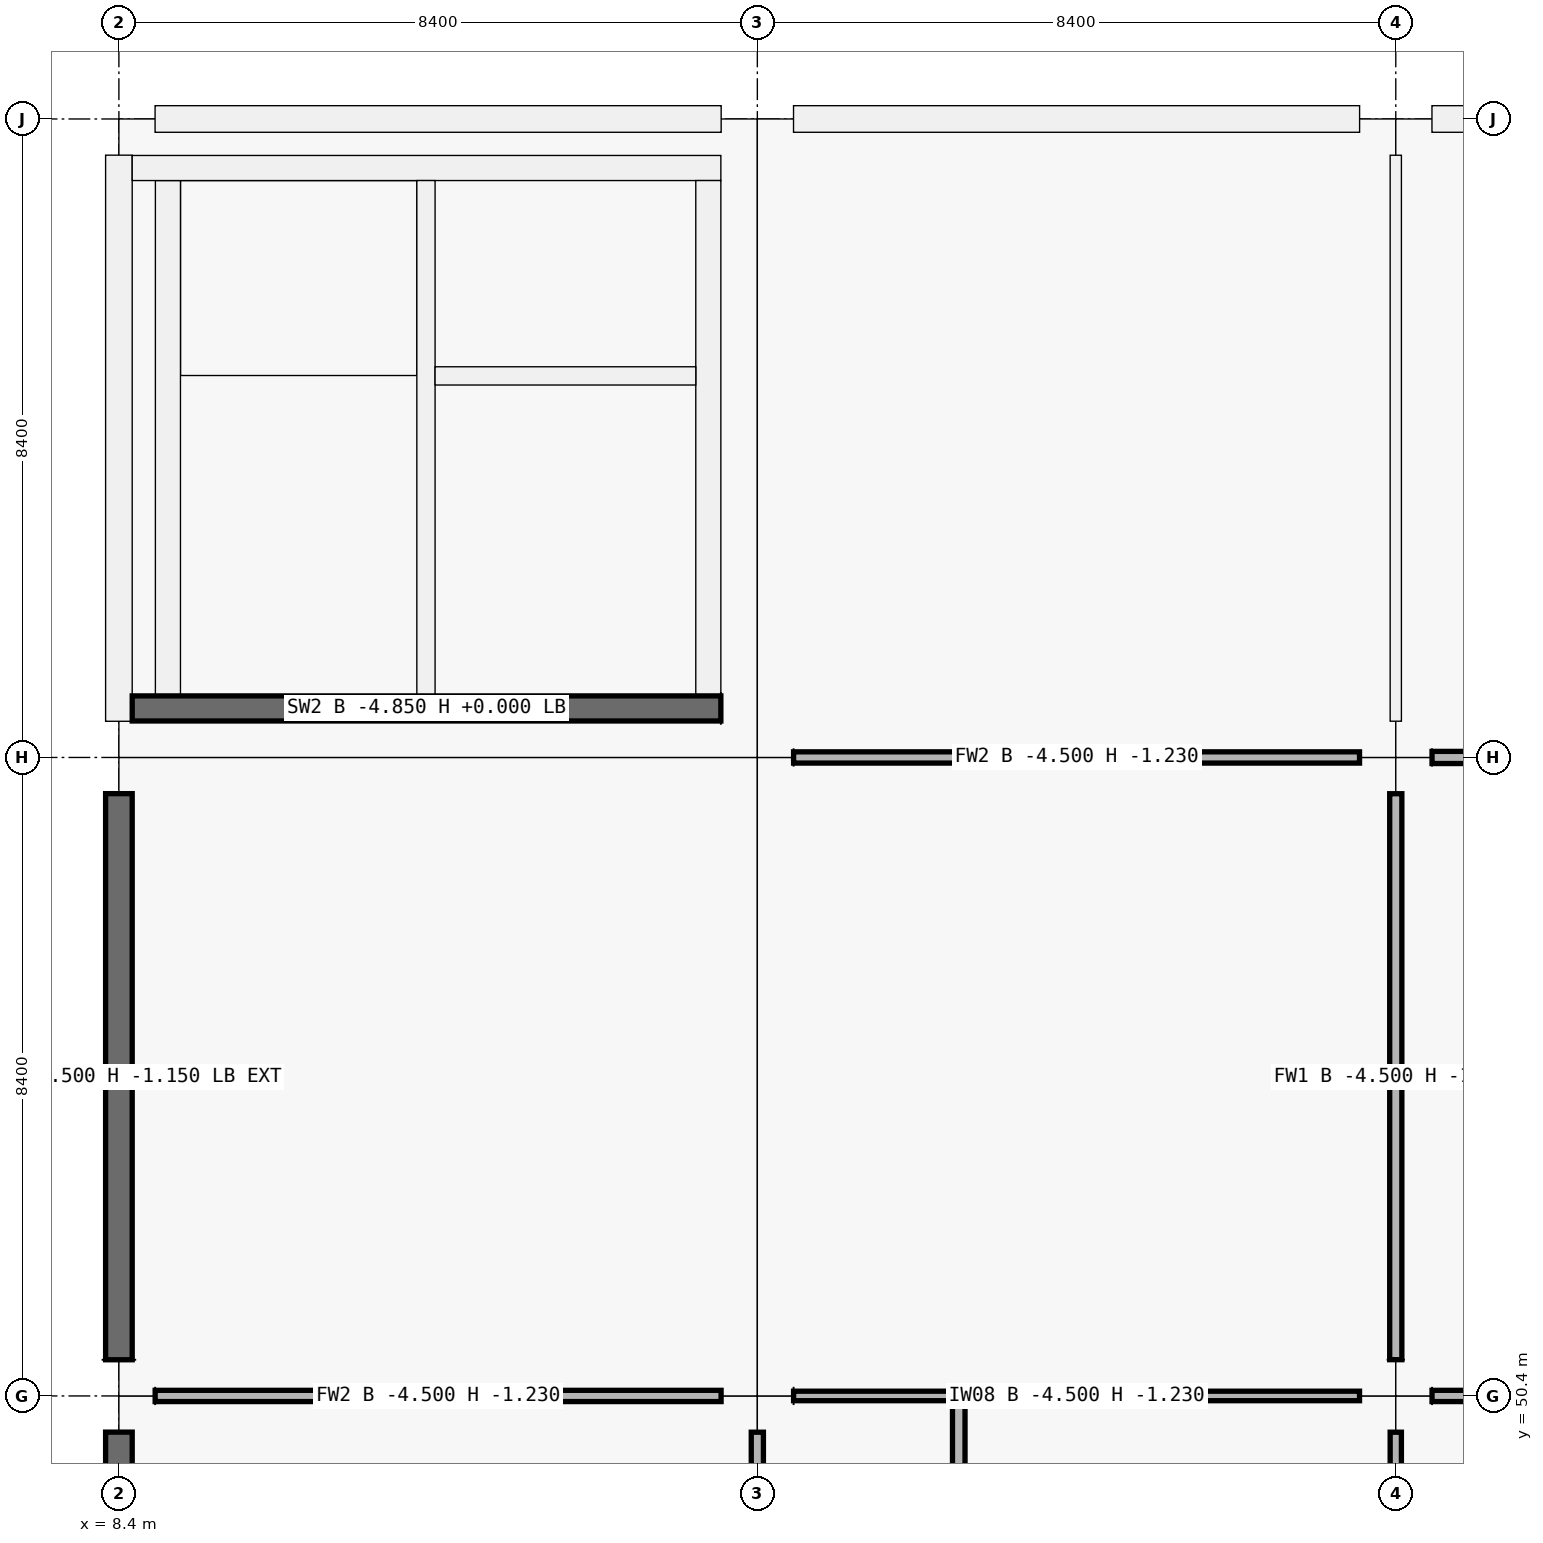
"""IFC4 building model, lengths in metres.
Left out: names, types, materials, properties, quantities, classifications, styles, units other than length and angle.
Written with IfcOpenShell. Run it as: python <this file> out.ifc"""

import sys

from ifc_helpers import new_model, si_unit, direction, frame, frame_2d, origin, origin_2d, place, context, subcontext, project, spatial, rectangle, extrude, element, fill, save


model = new_model("IFC4")
c1 = context("Model", 3, precision=1e-05, world=origin(), true_north=direction((0.0, 1.0)))
c2 = subcontext(c1, "Body", "Model", "MODEL_VIEW")
j1 = project(units=[si_unit("LENGTHUNIT", "METRE"), si_unit("PLANEANGLEUNIT", "RADIAN")], contexts=[c1])
p1 = place(None, origin())
s1 = spatial("IfcSite", under=j1, at=p1, CompositionType="ELEMENT")
p2 = place(p1, origin())
s2 = spatial("IfcBuilding", under=s1, at=p2, CompositionType="ELEMENT")
p3 = place(p2, frame((0.0, 0.0, -4.5)))
s3 = spatial("IfcBuildingStorey", under=s2, at=p3, CompositionType="ELEMENT", Elevation=-4.5)
for number, where, z_axis, x_axis in (
    (1, (8.4, 50.4, -0.35), (0.0, 0.0, 1.0), (1.0, 0.0, 0.0)),
    (2, (8.4, 58.8, -0.35), (0.0, 0.0, 1.0), (1.0, 0.0, 0.0)),
    (3, (8.4, 67.2, -0.35), (0.0, 0.0, 1.0), (1.0, 0.0, 0.0)),
    (4, (16.8, 50.4, -0.35), (0.0, 0.0, 1.0), (1.0, 0.0, 0.0)),
    (5, (16.8, 58.8, -0.35), (0.0, 0.0, 1.0), (1.0, 0.0, 0.0)),
    (6, (16.8, 67.2, -0.35), (0.0, 0.0, 1.0), (1.0, 0.0, 0.0)),
    (7, (25.2, 50.4, -0.35), (0.0, 0.0, 1.0), (1.0, 0.0, 0.0)),
    (8, (25.2, 58.8, -0.35), (0.0, 0.0, 1.0), (1.0, 0.0, 0.0)),
    (9, (25.2, 67.2, -0.35), (0.0, 0.0, 1.0), (1.0, 0.0, 0.0)),
):
    element("IfcColumn", number, at=place(p3, frame(where, z_axis=z_axis, x_axis=x_axis)), inside=s3, PredefinedType="COLUMN", context=c2, shape_type="SweptSolid", body=[
        extrude(rectangle(XDim=0.95, YDim=0.95, at=origin_2d()), origin(), (0.0, 0.0, 1.0), 4.85),
    ])
for number, where, z_axis, x_axis in (
    (10, (8.4, 42.476, 0.0), (0.0, 0.0, 1.0), (0.0, 1.0, 0.0)),
    (11, (8.4, 50.876, 0.0), (0.0, 0.0, 1.0), (0.0, 1.0, 0.0)),
):
    element("IfcWall", number, at=place(p3, frame(where, z_axis=z_axis, x_axis=x_axis)), inside=s3, PredefinedType="SOLIDWALL", context=c2, shape_type="SweptSolid", body=[
        extrude(rectangle(XDim=7.448, YDim=0.35, at=frame_2d((3.724, 0.0))), origin(), (0.0, 0.0, 1.0), 3.35),
    ])
p4 = place(p3, frame((8.4, 59.276, 0.0), z_axis=(0.0, 0.0, 1.0), x_axis=(0.0, 1.0, 0.0)))
e12 = element("IfcWall", 12, at=p4, inside=s3, PredefinedType="SOLIDWALL", context=c2, shape_type="SweptSolid", body=[
    extrude(rectangle(XDim=7.448, YDim=0.35, at=frame_2d((3.724, 0.0))), origin(), (0.0, 0.0, 1.0), 3.35),
])
p5 = place(p3, frame((8.876, 67.2, 0.0), z_axis=(0.0, 0.0, 1.0), x_axis=(1.0, 0.0, 0.0)))
e13 = element("IfcWall", 13, at=p5, inside=s3, PredefinedType="SOLIDWALL", context=c2, shape_type="SweptSolid", body=[
    extrude(rectangle(XDim=7.448, YDim=0.35, at=frame_2d((3.724, 0.0))), origin(), (0.0, 0.0, 1.0), 3.35),
])
p6 = place(p3, frame((17.276, 67.2, 0.0), z_axis=(0.0, 0.0, 1.0), x_axis=(1.0, 0.0, 0.0)))
e14 = element("IfcWall", 14, at=p6, inside=s3, PredefinedType="SOLIDWALL", context=c2, shape_type="SweptSolid", body=[
    extrude(rectangle(XDim=7.448, YDim=0.35, at=frame_2d((3.724, 0.0))), origin(), (0.0, 0.0, 1.0), 3.35),
])
p7 = place(p3, frame((25.676, 67.2, 0.0), z_axis=(0.0, 0.0, 1.0), x_axis=(1.0, 0.0, 0.0)))
e15 = element("IfcWall", 15, at=p7, inside=s3, PredefinedType="SOLIDWALL", context=c2, shape_type="SweptSolid", body=[
    extrude(rectangle(XDim=7.448, YDim=0.35, at=frame_2d((3.724, 0.0))), origin(), (0.0, 0.0, 1.0), 3.35),
])
p8 = place(p3, frame((16.32, 59.445, -0.35), z_axis=(0.0, 0.0, 1.0), x_axis=(-1.0, 0.0, 0.0)))
e16 = element("IfcWall", 16, at=p8, inside=s3, PredefinedType="SHEAR", context=c2, shape_type="SweptSolid", body=[
    extrude(rectangle(XDim=7.745, YDim=0.33, at=frame_2d((3.873, 0.0))), origin(), (0.0, 0.0, 1.0), 4.85),
])
p9 = place(p8, frame((1.28, 0.0, 0.35)))
e17 = element("IfcOpeningElement", 17, at=p9, cuts=e16, PredefinedType="OPENING", context=c2, shape_type="SweptSolid", body=[
    extrude(rectangle(XDim=1.5, YDim=2.15, at=frame_2d((0.75, 1.075))), frame((0.0, 0.165, 0.0), z_axis=(0.0, -1.0, 0.0), x_axis=(1.0, 0.0, 0.0)), (0.0, 0.0, 1.0), 0.33),
])
p10 = place(p3, frame((9.045, 59.61, -0.35), z_axis=(0.0, 0.0, 1.0), x_axis=(0.0, 1.0, 0.0)))
e18 = element("IfcWall", 18, at=p10, inside=s3, PredefinedType="SHEAR", context=c2, shape_type="SweptSolid", body=[
    extrude(rectangle(XDim=6.78, YDim=0.33, at=frame_2d((3.39, 0.0))), origin(), (0.0, 0.0, 1.0), 4.85),
])
p11 = place(p3, frame((8.575, 66.555, -0.35), z_axis=(0.0, 0.0, 1.0), x_axis=(1.0, 0.0, 0.0)))
e19 = element("IfcWall", 19, at=p11, inside=s3, PredefinedType="SHEAR", context=c2, shape_type="SweptSolid", body=[
    extrude(rectangle(XDim=7.745, YDim=0.33, at=frame_2d((3.873, 0.0))), origin(), (0.0, 0.0, 1.0), 4.85),
])
p12 = place(p3, frame((16.155, 66.39, -0.35), z_axis=(0.0, 0.0, 1.0), x_axis=(0.0, -1.0, 0.0)))
e20 = element("IfcWall", 20, at=p12, inside=s3, PredefinedType="SHEAR", context=c2, shape_type="SweptSolid", body=[
    extrude(rectangle(XDim=6.78, YDim=0.33, at=frame_2d((3.39, 0.0))), origin(), (0.0, 0.0, 1.0), 4.85),
])
p13 = place(p3, frame((12.44, 59.61, -0.35), z_axis=(0.0, 0.0, 1.0), x_axis=(0.0, 1.0, 0.0)))
e21 = element("IfcWall", 21, at=p13, inside=s3, PredefinedType="SHEAR", context=c2, shape_type="SweptSolid", body=[
    extrude(rectangle(XDim=6.78, YDim=0.24, at=frame_2d((3.39, 0.0))), origin(), (0.0, 0.0, 1.0), 4.85),
])
p14 = place(p13, frame((0.12, 0.0, 0.35)))
e22 = element("IfcOpeningElement", 22, at=p14, cuts=e21, PredefinedType="OPENING", context=c2, shape_type="SweptSolid", body=[
    extrude(rectangle(XDim=1.0, YDim=2.15, at=frame_2d((0.5, 1.075))), frame((0.0, 0.12, 0.0), z_axis=(0.0, -1.0, 0.0), x_axis=(1.0, 0.0, 0.0)), (0.0, 0.0, 1.0), 0.24),
])
p15 = place(p3, frame((12.56, 63.82, -0.35), z_axis=(0.0, 0.0, 1.0), x_axis=(1.0, 0.0, 0.0)))
e23 = element("IfcWall", 23, at=p15, inside=s3, PredefinedType="SHEAR", context=c2, shape_type="SweptSolid", body=[
    extrude(rectangle(XDim=3.43, YDim=0.24, at=frame_2d((1.715, 0.0))), origin(), (0.0, 0.0, 1.0), 4.85),
])
p16 = place(p15, frame((1.165, 0.0, 0.35)))
e24 = element("IfcOpeningElement", 24, at=p16, cuts=e23, PredefinedType="OPENING", context=c2, shape_type="SweptSolid", body=[
    extrude(rectangle(XDim=1.1, YDim=2.15, at=frame_2d((0.55, 1.075))), frame((0.0, 0.12, 0.0), z_axis=(0.0, -1.0, 0.0), x_axis=(1.0, 0.0, 0.0)), (0.0, 0.0, 1.0), 0.24),
])
p17 = place(p3, frame((8.877, 50.4, 0.0), z_axis=(0.0, 0.0, 1.0), x_axis=(1.0, 0.0, 0.0)))
e25 = element("IfcWall", 25, at=p17, inside=s3, PredefinedType="PARTITIONING", context=c2, shape_type="SweptSolid", body=[
    extrude(rectangle(XDim=7.446, YDim=0.148, at=frame_2d((3.723, 0.0))), origin(), (0.0, 0.0, 1.0), 3.27),
])
p18 = place(p17, frame((3.148, 0.0, 0.0)))
e26 = element("IfcOpeningElement", 26, at=p18, cuts=e25, PredefinedType="OPENING", context=c2, shape_type="SweptSolid", body=[
    extrude(rectangle(XDim=1.15, YDim=2.2, at=frame_2d((0.575, 1.1))), frame((0.0, 0.074, 0.0), z_axis=(0.0, -1.0, 0.0), x_axis=(1.0, 0.0, 0.0)), (0.0, 0.0, 1.0), 0.148),
])
p19 = place(p3, frame((17.277, 50.4, 0.0), z_axis=(0.0, 0.0, 1.0), x_axis=(1.0, 0.0, 0.0)))
e27 = element("IfcWall", 27, at=p19, inside=s3, PredefinedType="PARTITIONING", context=c2, shape_type="SweptSolid", body=[
    extrude(rectangle(XDim=7.446, YDim=0.125, at=frame_2d((3.723, 0.0))), origin(), (0.0, 0.0, 1.0), 3.27),
])
p20 = place(p19, frame((0.528, 0.0, 0.0)))
e28 = element("IfcOpeningElement", 28, at=p20, cuts=e27, PredefinedType="OPENING", context=c2, shape_type="SweptSolid", body=[
    extrude(rectangle(XDim=0.92, YDim=2.1, at=frame_2d((0.46, 1.05))), frame((0.0, 0.062, 0.0), z_axis=(0.0, -1.0, 0.0), x_axis=(1.0, 0.0, 0.0)), (0.0, 0.0, 1.0), 0.125),
])
p21 = place(p19, frame((4.418, 0.0, 0.0)))
e29 = element("IfcOpeningElement", 29, at=p21, cuts=e27, PredefinedType="OPENING", context=c2, shape_type="SweptSolid", body=[
    extrude(rectangle(XDim=0.98, YDim=2.08, at=frame_2d((0.49, 1.04))), frame((0.0, 0.062, 0.0), z_axis=(0.0, -1.0, 0.0), x_axis=(1.0, 0.0, 0.0)), (0.0, 0.0, 1.0), 0.125),
])
p22 = place(p3, frame((17.277, 58.8, 0.0), z_axis=(0.0, 0.0, 1.0), x_axis=(1.0, 0.0, 0.0)))
e30 = element("IfcWall", 30, at=p22, inside=s3, PredefinedType="PARTITIONING", context=c2, shape_type="SweptSolid", body=[
    extrude(rectangle(XDim=7.446, YDim=0.148, at=frame_2d((3.723, 0.0))), origin(), (0.0, 0.0, 1.0), 3.27),
])
p23 = place(p22, frame((3.173, 0.0, 0.0)))
e31 = element("IfcOpeningElement", 31, at=p23, cuts=e30, PredefinedType="OPENING", context=c2, shape_type="SweptSolid", body=[
    extrude(rectangle(XDim=1.1, YDim=2.15, at=frame_2d((0.55, 1.075))), frame((0.0, 0.074, 0.0), z_axis=(0.0, -1.0, 0.0), x_axis=(1.0, 0.0, 0.0)), (0.0, 0.0, 1.0), 0.148),
])
p24 = place(p3, frame((25.677, 50.4, 0.0), z_axis=(0.0, 0.0, 1.0), x_axis=(1.0, 0.0, 0.0)))
e32 = element("IfcWall", 32, at=p24, inside=s3, PredefinedType="PARTITIONING", context=c2, shape_type="SweptSolid", body=[
    extrude(rectangle(XDim=7.446, YDim=0.148, at=frame_2d((3.723, 0.0))), origin(), (0.0, 0.0, 1.0), 3.27),
])
p25 = place(p24, frame((3.223, 0.0, 0.0)))
e33 = element("IfcOpeningElement", 33, at=p25, cuts=e32, PredefinedType="OPENING", context=c2, shape_type="SweptSolid", body=[
    extrude(rectangle(XDim=1.0, YDim=2.15, at=frame_2d((0.5, 1.075))), frame((0.0, 0.074, 0.0), z_axis=(0.0, -1.0, 0.0), x_axis=(1.0, 0.0, 0.0)), (0.0, 0.0, 1.0), 0.148),
])
p26 = place(p3, frame((25.677, 58.8, 0.0), z_axis=(0.0, 0.0, 1.0), x_axis=(1.0, 0.0, 0.0)))
e34 = element("IfcWall", 34, at=p26, inside=s3, PredefinedType="PARTITIONING", context=c2, shape_type="SweptSolid", body=[
    extrude(rectangle(XDim=7.446, YDim=0.16, at=frame_2d((3.723, 0.0))), origin(), (0.0, 0.0, 1.0), 3.27),
])
p27 = place(p26, frame((3.273, 0.0, 0.0)))
e35 = element("IfcOpeningElement", 35, at=p27, cuts=e34, PredefinedType="OPENING", context=c2, shape_type="SweptSolid", body=[
    extrude(rectangle(XDim=0.9, YDim=2.05, at=frame_2d((0.45, 1.025))), frame((0.0, 0.08, 0.0), z_axis=(0.0, -1.0, 0.0), x_axis=(1.0, 0.0, 0.0)), (0.0, 0.0, 1.0), 0.16),
])
p28 = place(p3, frame((16.8, 42.477, 0.0), z_axis=(0.0, 0.0, 1.0), x_axis=(0.0, 1.0, 0.0)))
e36 = element("IfcWall", 36, at=p28, inside=s3, PredefinedType="PARTITIONING", context=c2, shape_type="SweptSolid", body=[
    extrude(rectangle(XDim=7.446, YDim=0.16, at=frame_2d((3.723, 0.0))), origin(), (0.0, 0.0, 1.0), 3.27),
])
p29 = place(p3, frame((25.2, 42.477, 0.0), z_axis=(0.0, 0.0, 1.0), x_axis=(0.0, 1.0, 0.0)))
e37 = element("IfcWall", 37, at=p29, inside=s3, PredefinedType="PARTITIONING", context=c2, shape_type="SweptSolid", body=[
    extrude(rectangle(XDim=7.446, YDim=0.148, at=frame_2d((3.723, 0.0))), origin(), (0.0, 0.0, 1.0), 3.27),
])
p30 = place(p3, frame((25.2, 50.877, 0.0), z_axis=(0.0, 0.0, 1.0), x_axis=(0.0, 1.0, 0.0)))
e38 = element("IfcWall", 38, at=p30, inside=s3, PredefinedType="PARTITIONING", context=c2, shape_type="SweptSolid", body=[
    extrude(rectangle(XDim=7.446, YDim=0.16, at=frame_2d((3.723, 0.0))), origin(), (0.0, 0.0, 1.0), 3.27),
])
p31 = place(p30, frame((3.148, 0.0, 0.0)))
e39 = element("IfcOpeningElement", 39, at=p31, cuts=e38, PredefinedType="OPENING", context=c2, shape_type="SweptSolid", body=[
    extrude(rectangle(XDim=1.15, YDim=2.2, at=frame_2d((0.575, 1.1))), frame((0.0, 0.08, 0.0), z_axis=(0.0, -1.0, 0.0), x_axis=(1.0, 0.0, 0.0)), (0.0, 0.0, 1.0), 0.16),
])
p32 = place(p3, frame((25.2, 59.277, 0.0), z_axis=(0.0, 0.0, 1.0), x_axis=(0.0, 1.0, 0.0)))
e40 = element("IfcWall", 40, at=p32, inside=s3, PredefinedType="PARTITIONING", context=c2, shape_type="SweptSolid", body=[
    extrude(rectangle(XDim=7.446, YDim=0.148, at=frame_2d((3.723, 0.0))), origin(), (0.0, 0.0, 1.0), 3.27),
])
p33 = place(p3, frame((19.45, 42.09, 0.0), z_axis=(0.0, 0.0, 1.0), x_axis=(0.0, 1.0, 0.0)))
e41 = element("IfcWall", 41, at=p33, inside=s3, PredefinedType="PARTITIONING", context=c2, shape_type="SweptSolid", body=[
    extrude(rectangle(XDim=8.246, YDim=0.165, at=frame_2d((4.123, 0.0))), origin(), (0.0, 0.0, 1.0), 3.27),
])
p34 = place(p14, origin())
e42 = element("IfcDoor", 42, at=p34, inside=s3, OperationType="SINGLE_SWING_LEFT", PredefinedType="DOOR", context=c2, shape_type="SweptSolid", body=[
    extrude(rectangle(XDim=1.0, YDim=2.15, at=frame_2d((0.5, 1.075))), frame((0.0, 0.025, 0.0), z_axis=(0.0, -1.0, 0.0), x_axis=(1.0, 0.0, 0.0)), (0.0, 0.0, 1.0), 0.05),
])
fill(e22, e42)
p35 = place(p9, origin())
e43 = element("IfcDoor", 43, at=p35, inside=s3, OperationType="DOUBLE_DOOR_SINGLE_SWING", PredefinedType="DOOR", context=c2, shape_type="SweptSolid", body=[
    extrude(rectangle(XDim=1.5, YDim=2.15, at=frame_2d((0.75, 1.075))), frame((0.0, 0.025, 0.0), z_axis=(0.0, -1.0, 0.0), x_axis=(1.0, 0.0, 0.0)), (0.0, 0.0, 1.0), 0.05),
])
fill(e17, e43)
p36 = place(p16, origin())
e44 = element("IfcDoor", 44, at=p36, inside=s3, OperationType="DOUBLE_DOOR_SLIDING", PredefinedType="DOOR", context=c2, shape_type="SweptSolid", body=[
    extrude(rectangle(XDim=1.1, YDim=2.15, at=frame_2d((0.55, 1.075))), frame((0.0, 0.025, 0.0), z_axis=(0.0, -1.0, 0.0), x_axis=(1.0, 0.0, 0.0)), (0.0, 0.0, 1.0), 0.05),
])
fill(e24, e44)
p37 = place(p20, origin())
e45 = element("IfcDoor", 45, at=p37, inside=s3, OperationType="SINGLE_SWING_RIGHT", PredefinedType="DOOR", context=c2, shape_type="SweptSolid", body=[
    extrude(rectangle(XDim=0.92, YDim=2.1, at=frame_2d((0.46, 1.05))), frame((0.0, 0.025, 0.0), z_axis=(0.0, -1.0, 0.0), x_axis=(1.0, 0.0, 0.0)), (0.0, 0.0, 1.0), 0.05),
])
fill(e28, e45)
p38 = place(p21, origin())
e46 = element("IfcDoor", 46, at=p38, inside=s3, OperationType="SINGLE_SWING_LEFT", PredefinedType="DOOR", context=c2, shape_type="SweptSolid", body=[
    extrude(rectangle(XDim=0.98, YDim=2.08, at=frame_2d((0.49, 1.04))), frame((0.0, 0.025, 0.0), z_axis=(0.0, -1.0, 0.0), x_axis=(1.0, 0.0, 0.0)), (0.0, 0.0, 1.0), 0.05),
])
fill(e29, e46)
p39 = place(p18, origin())
e47 = element("IfcDoor", 47, at=p39, inside=s3, OperationType="SINGLE_SWING_RIGHT", PredefinedType="DOOR", context=c2, shape_type="SweptSolid", body=[
    extrude(rectangle(XDim=1.15, YDim=2.2, at=frame_2d((0.575, 1.1))), frame((0.0, 0.025, 0.0), z_axis=(0.0, -1.0, 0.0), x_axis=(1.0, 0.0, 0.0)), (0.0, 0.0, 1.0), 0.05),
])
fill(e26, e47)
p40 = place(p23, origin())
e48 = element("IfcDoor", 48, at=p40, inside=s3, OperationType="SINGLE_SWING_LEFT", PredefinedType="DOOR", context=c2, shape_type="SweptSolid", body=[
    extrude(rectangle(XDim=1.1, YDim=2.15, at=frame_2d((0.55, 1.075))), frame((0.0, 0.025, 0.0), z_axis=(0.0, -1.0, 0.0), x_axis=(1.0, 0.0, 0.0)), (0.0, 0.0, 1.0), 0.05),
])
fill(e31, e48)
p41 = place(p31, origin())
e49 = element("IfcDoor", 49, at=p41, inside=s3, OperationType="SINGLE_SWING_RIGHT", PredefinedType="DOOR", context=c2, shape_type="SweptSolid", body=[
    extrude(rectangle(XDim=1.15, YDim=2.2, at=frame_2d((0.575, 1.1))), frame((0.0, 0.025, 0.0), z_axis=(0.0, -1.0, 0.0), x_axis=(1.0, 0.0, 0.0)), (0.0, 0.0, 1.0), 0.05),
])
fill(e39, e49)
save(model, sys.argv[1])
